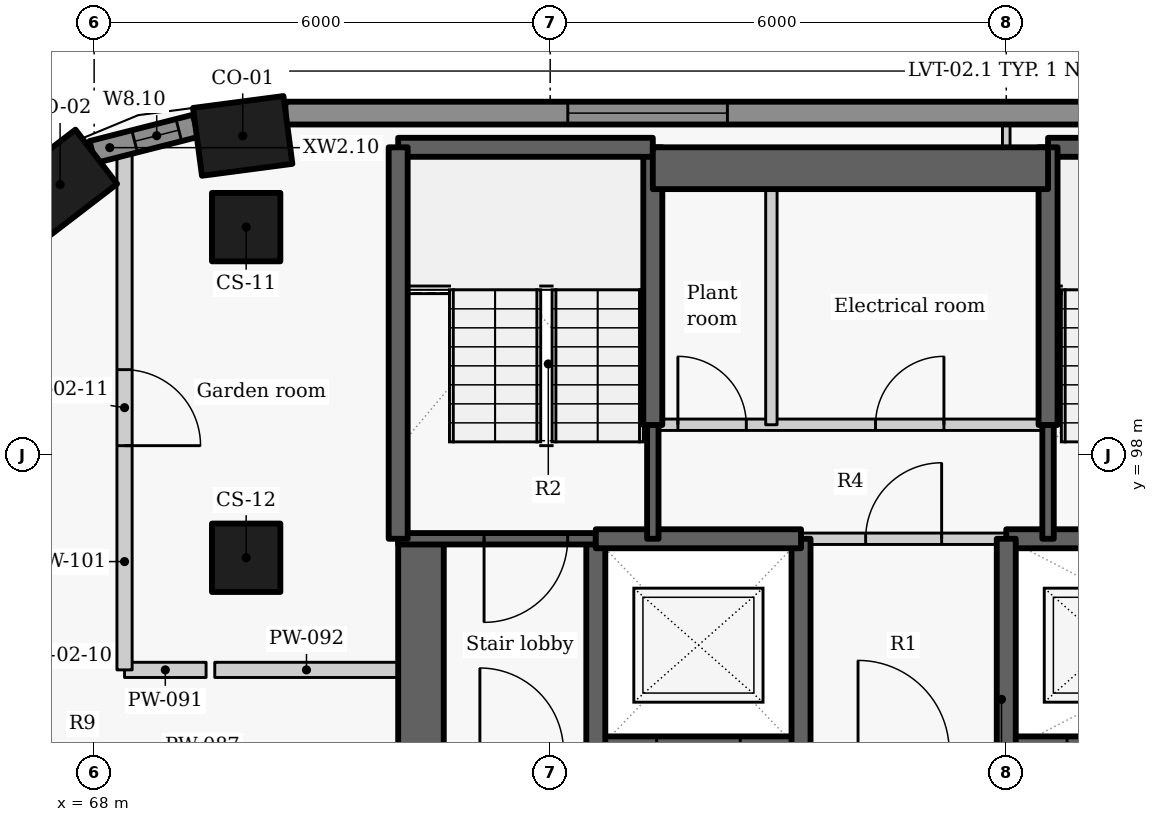
"""IFC4 building model, lengths in metres.
Left out: names, types, materials, properties, quantities, classifications, styles, units other than length and angle.
Written with IfcOpenShell. Run it as: python <this file> out.ifc"""

import sys

from ifc_helpers import new_model, si_unit, direction, frame, frame_2d, origin, origin_2d, place, context, subcontext, project, spatial, rectangle, extrude, element, fill, save


model = new_model("IFC4")
c1 = context("Model", 3, precision=1e-05, world=origin(), true_north=direction((0.0, 1.0)))
c2 = subcontext(c1, "Body", "Model", "MODEL_VIEW")
j1 = project(units=[si_unit("LENGTHUNIT", "METRE"), si_unit("PLANEANGLEUNIT", "RADIAN")], contexts=[c1])
p1 = place(None, origin())
s1 = spatial("IfcSite", under=j1, at=p1, CompositionType="ELEMENT")
p2 = place(p1, origin())
s2 = spatial("IfcBuilding", under=s1, at=p2, CompositionType="ELEMENT")
p3 = place(p2, frame((0.0, 0.0, 183.3)))
s3 = spatial("IfcBuildingStorey", under=s2, at=p3, CompositionType="ELEMENT", Elevation=183.3)
for number, where, z_axis, x_axis in (
    (1, (69.955, 102.2, 0.0), (0.0, 0.0, 1.0), (-0.991, -0.131, 0.0)),
    (2, (67.552, 101.56, 0.0), (0.0, 0.0, 1.0), (-0.793, -0.609, 0.0)),
):
    element("IfcColumn", number, at=place(p3, frame(where, z_axis=z_axis, x_axis=x_axis)), inside=s3, PredefinedType="COLUMN", context=c2, shape_type="SweptSolid", body=[
        extrude(rectangle(XDim=1.2, YDim=0.9, at=origin_2d()), origin(), (0.0, 0.0, 1.0), 3.3),
    ])
for number, where, z_axis, x_axis in (
    (3, (70.0, 101.0, 0.0), (0.0, 0.0, 1.0), (0.0, -1.0, 0.0)),
    (4, (70.0, 96.65, 0.0), (0.0, 0.0, 1.0), (0.0, -1.0, 0.0)),
):
    element("IfcColumn", number, at=place(p3, frame(where, z_axis=z_axis, x_axis=x_axis)), inside=s3, PredefinedType="COLUMN", context=c2, shape_type="SweptSolid", body=[
        extrude(rectangle(XDim=0.9, YDim=0.9, at=origin_2d()), origin(), (0.0, 0.0, 1.0), 3.3),
    ])
p4 = place(p3, frame((89.449, 102.5, 0.0), z_axis=(0.0, 0.0, 1.0), x_axis=(-1.0, 0.0, 0.0)))
e5 = element("IfcWall", 5, at=p4, inside=s3, PredefinedType="SOLIDWALL", context=c2, shape_type="SweptSolid", body=[
    extrude(rectangle(XDim=18.933, YDim=0.3, at=frame_2d((9.466, 0.0))), origin(), (0.0, 0.0, 1.0), 2.425),
])
p5 = place(p4, frame((3.687, 0.0, 0.9)))
e6 = element("IfcOpeningElement", 6, at=p5, cuts=e5, PredefinedType="OPENING", context=c2, shape_type="SweptSolid", body=[
    extrude(rectangle(XDim=2.1, YDim=1.1, at=frame_2d((1.05, 0.55))), frame((0.0, 0.16, 0.0), z_axis=(0.0, -1.0, 0.0), x_axis=(1.0, 0.0, 0.0)), (0.0, 0.0, 1.0), 0.32),
])
p6 = place(p4, frame((13.118, 0.0, 0.9)))
e7 = element("IfcOpeningElement", 7, at=p6, cuts=e5, PredefinedType="OPENING", context=c2, shape_type="SweptSolid", body=[
    extrude(rectangle(XDim=2.1, YDim=1.1, at=frame_2d((1.05, 0.55))), frame((0.0, 0.16, 0.0), z_axis=(0.0, -1.0, 0.0), x_axis=(1.0, 0.0, 0.0)), (0.0, 0.0, 1.0), 0.32),
])
p7 = place(p3, frame((69.336, 102.333, 0.0), z_axis=(0.0, 0.0, 1.0), x_axis=(-0.969037396898, -0.246914000036, 0.0)))
e8 = element("IfcWall", 8, at=p7, inside=s3, PredefinedType="SOLIDWALL", context=c2, shape_type="SweptSolid", body=[
    extrude(rectangle(XDim=1.403, YDim=0.3, at=frame_2d((0.702, 0.0))), origin(), (0.0, 0.0, 1.0), 2.425),
])
p8 = place(p7, frame((0.229, 0.0, 0.9)))
e9 = element("IfcOpeningElement", 9, at=p8, cuts=e8, PredefinedType="OPENING", context=c2, shape_type="SweptSolid", body=[
    extrude(rectangle(XDim=0.6, YDim=1.1, at=frame_2d((0.3, 0.55))), frame((0.0, 0.16, 0.0), z_axis=(0.0, -1.0, 0.0), x_axis=(1.0, 0.0, 0.0)), (0.0, 0.0, 1.0), 0.32),
])
p9 = place(p3, frame((72.3, 87.8, -0.275), z_axis=(0.0, 0.0, 1.0), x_axis=(0.0, 1.0, 0.0)))
e10 = element("IfcWall", 10, at=p9, inside=s3, PredefinedType="SHEAR", context=c2, shape_type="SweptSolid", body=[
    extrude(rectangle(XDim=9.1, YDim=0.6, at=frame_2d((4.55, 0.0))), origin(), (0.0, 0.0, 1.0), 3.3),
])
p10 = place(p9, frame((3.852, 0.0, 0.275)))
e11 = element("IfcOpeningElement", 11, at=p10, cuts=e10, PredefinedType="OPENING", context=c2, shape_type="SweptSolid", body=[
    extrude(rectangle(XDim=1.5, YDim=2.1, at=frame_2d((0.75, 1.05))), frame((0.0, 0.31, 0.0), z_axis=(0.0, -1.0, 0.0), x_axis=(1.0, 0.0, 0.0)), (0.0, 0.0, 1.0), 0.62),
])
p11 = place(p3, frame((74.597, 94.1, -0.275), z_axis=(0.0, 0.0, 1.0), x_axis=(1.0, 0.0, 0.0)))
e12 = element("IfcWall", 12, at=p11, inside=s3, PredefinedType="SHEAR", context=c2, shape_type="SweptSolid", body=[
    extrude(rectangle(XDim=2.706, YDim=0.4, at=frame_2d((1.353, 0.0))), origin(), (0.0, 0.0, 1.0), 3.3),
])
p12 = place(p11, frame((0.803, 0.0, 0.275)))
e13 = element("IfcOpeningElement", 13, at=p12, cuts=e12, PredefinedType="OPENING", context=c2, shape_type="SweptSolid", body=[
    extrude(rectangle(XDim=1.1, YDim=2.1, at=frame_2d((0.55, 1.05))), frame((0.0, 0.21, 0.0), z_axis=(0.0, -1.0, 0.0), x_axis=(1.0, 0.0, 0.0)), (0.0, 0.0, 1.0), 0.42),
])
p13 = place(p3, frame((79.997, 94.1, -0.275), z_axis=(0.0, 0.0, 1.0), x_axis=(1.0, 0.0, 0.0)))
e14 = element("IfcWall", 14, at=p13, inside=s3, PredefinedType="SHEAR", context=c2, shape_type="SweptSolid", body=[
    extrude(rectangle(XDim=5.406, YDim=0.4, at=frame_2d((2.703, 0.0))), origin(), (0.0, 0.0, 1.0), 3.3),
])
p14 = place(p13, frame((0.803, 0.0, 0.275)))
e15 = element("IfcOpeningElement", 15, at=p14, cuts=e14, PredefinedType="OPENING", context=c2, shape_type="SweptSolid", body=[
    extrude(rectangle(XDim=1.1, YDim=2.1, at=frame_2d((0.55, 1.05))), frame((0.0, 0.21, 0.0), z_axis=(0.0, -1.0, 0.0), x_axis=(1.0, 0.0, 0.0)), (0.0, 0.0, 1.0), 0.42),
])
p15 = place(p3, frame((74.6, 94.1, -0.275), z_axis=(0.0, 0.0, 1.0), x_axis=(0.0, 1.0, 0.0)))
e16 = element("IfcWall", 16, at=p15, inside=s3, PredefinedType="SHEAR", context=c2, shape_type="SweptSolid", body=[
    extrude(rectangle(XDim=2.8, YDim=0.25, at=frame_2d((1.4, 0.0))), origin(), (0.0, 0.0, 1.0), 3.3),
])
p16 = place(p3, frame((74.6, 96.9, -0.275), z_axis=(0.0, 0.0, 1.0), x_axis=(-1.0, 0.0, 0.0)))
e17 = element("IfcWall", 17, at=p16, inside=s3, PredefinedType="SHEAR", context=c2, shape_type="SweptSolid", body=[
    extrude(rectangle(XDim=2.6, YDim=0.15, at=frame_2d((1.3, 0.0))), origin(), (0.0, 0.0, 1.0), 3.3),
])
p17 = place(p16, frame((0.37, 0.0, 0.275)))
e18 = element("IfcOpeningElement", 18, at=p17, cuts=e17, PredefinedType="OPENING", context=c2, shape_type="SweptSolid", body=[
    extrude(rectangle(XDim=1.1, YDim=2.1, at=frame_2d((0.55, 1.05))), frame((0.0, 0.085, 0.0), z_axis=(0.0, -1.0, 0.0), x_axis=(1.0, 0.0, 0.0)), (0.0, 0.0, 1.0), 0.17),
])
p18 = place(p3, frame((77.3, 94.1, -0.275), z_axis=(0.0, 0.0, 1.0), x_axis=(0.0, 1.0, 0.0)))
e19 = element("IfcWall", 19, at=p18, inside=s3, PredefinedType="SHEAR", context=c2, shape_type="SweptSolid", body=[
    extrude(rectangle(XDim=2.8, YDim=0.25, at=frame_2d((1.4, 0.0))), origin(), (0.0, 0.0, 1.0), 3.3),
])
p19 = place(p3, frame((74.6, 96.9, -0.275), z_axis=(0.0, 0.0, 1.0), x_axis=(1.0, 0.0, 0.0)))
e20 = element("IfcWall", 20, at=p19, inside=s3, PredefinedType="SHEAR", context=c2, shape_type="SweptSolid", body=[
    extrude(rectangle(XDim=2.7, YDim=0.25, at=frame_2d((1.35, 0.0))), origin(), (0.0, 0.0, 1.0), 3.3),
])
p20 = place(p3, frame((80.0, 96.9, -0.275), z_axis=(0.0, 0.0, 1.0), x_axis=(1.0, 0.0, 0.0)))
e21 = element("IfcWall", 21, at=p20, inside=s3, PredefinedType="SHEAR", context=c2, shape_type="SweptSolid", body=[
    extrude(rectangle(XDim=8.0, YDim=0.25, at=frame_2d((4.0, 0.0))), origin(), (0.0, 0.0, 1.0), 3.3),
])
p21 = place(p20, frame((3.849, 0.0, 0.275)))
e22 = element("IfcOpeningElement", 22, at=p21, cuts=e21, PredefinedType="OPENING", context=c2, shape_type="SweptSolid", body=[
    extrude(rectangle(XDim=1.1, YDim=2.1, at=frame_2d((0.55, 1.05))), frame((0.0, 0.135, 0.0), z_axis=(0.0, -1.0, 0.0), x_axis=(1.0, 0.0, 0.0)), (0.0, 0.0, 1.0), 0.27),
])
p22 = place(p3, frame((80.0, 94.1, -0.275), z_axis=(0.0, 0.0, 1.0), x_axis=(0.0, 1.0, 0.0)))
e23 = element("IfcWall", 23, at=p22, inside=s3, PredefinedType="SHEAR", context=c2, shape_type="SweptSolid", body=[
    extrude(rectangle(XDim=2.8, YDim=0.25, at=frame_2d((1.4, 0.0))), origin(), (0.0, 0.0, 1.0), 3.3),
])
p23 = place(p3, frame((77.3, 96.9, 0.0), z_axis=(0.0, 0.0, 1.0), x_axis=(1.0, 0.0, 0.0)))
e24 = element("IfcWall", 24, at=p23, inside=s3, PredefinedType="PARTITIONING", context=c2, shape_type="SweptSolid", body=[
    extrude(rectangle(XDim=2.7, YDim=0.15, at=frame_2d((1.35, 0.0))), origin(), (0.0, 0.0, 1.0), 3.025),
])
p24 = place(p23, frame((0.85, 0.0, 0.0)))
e25 = element("IfcOpeningElement", 25, at=p24, cuts=e24, PredefinedType="OPENING", context=c2, shape_type="SweptSolid", body=[
    extrude(rectangle(XDim=1.0, YDim=2.1, at=frame_2d((0.5, 1.05))), frame((0.0, 0.085, 0.0), z_axis=(0.0, -1.0, 0.0), x_axis=(1.0, 0.0, 0.0)), (0.0, 0.0, 1.0), 0.17),
])
p25 = place(p3, frame((75.35, 96.9, -0.275), z_axis=(0.0, 0.0, 1.0), x_axis=(0.0, 1.0, 0.0)))
e26 = element("IfcWall", 26, at=p25, inside=s3, PredefinedType="SHEAR", context=c2, shape_type="SweptSolid", body=[
    extrude(rectangle(XDim=1.503, YDim=0.15, at=frame_2d((0.751, 0.0))), origin(), (0.0, 0.0, 1.0), 3.3),
])
p26 = place(p3, frame((75.35, 98.397, -0.275), z_axis=(0.0, 0.0, 1.0), x_axis=(0.0, 1.0, 0.0)))
e27 = element("IfcWall", 27, at=p26, inside=s3, PredefinedType="SHEAR", context=c2, shape_type="SweptSolid", body=[
    extrude(rectangle(XDim=3.653, YDim=0.25, at=frame_2d((1.827, 0.0))), origin(), (0.0, 0.0, 1.0), 3.3),
])
p27 = place(p3, frame((72.0, 102.05, -0.275), z_axis=(0.0, 0.0, 1.0), x_axis=(1.0, 0.0, 0.0)))
e28 = element("IfcWall", 28, at=p27, inside=s3, PredefinedType="SHEAR", context=c2, shape_type="SweptSolid", body=[
    extrude(rectangle(XDim=3.35, YDim=0.25, at=frame_2d((1.675, 0.0))), origin(), (0.0, 0.0, 1.0), 3.3),
])
p28 = place(p3, frame((80.55, 102.05, -0.275), z_axis=(0.0, 0.0, 1.0), x_axis=(1.0, 0.0, 0.0)))
e29 = element("IfcWall", 29, at=p28, inside=s3, PredefinedType="SHEAR", context=c2, shape_type="SweptSolid", body=[
    extrude(rectangle(XDim=2.85, YDim=0.25, at=frame_2d((1.425, 0.0))), origin(), (0.0, 0.0, 1.0), 3.3),
])
p29 = place(p3, frame((72.0, 96.9, -0.275), z_axis=(0.0, 0.0, 1.0), x_axis=(0.0, 1.0, 0.0)))
e30 = element("IfcWall", 30, at=p29, inside=s3, PredefinedType="SHEAR", context=c2, shape_type="SweptSolid", body=[
    extrude(rectangle(XDim=5.15, YDim=0.25, at=frame_2d((2.575, 0.0))), origin(), (0.0, 0.0, 1.0), 3.3),
])
p30 = place(p3, frame((80.55, 96.9, -0.275), z_axis=(0.0, 0.0, 1.0), x_axis=(0.0, 1.0, 0.0)))
e31 = element("IfcWall", 31, at=p30, inside=s3, PredefinedType="SHEAR", context=c2, shape_type="SweptSolid", body=[
    extrude(rectangle(XDim=1.503, YDim=0.15, at=frame_2d((0.751, 0.0))), origin(), (0.0, 0.0, 1.0), 3.3),
])
p31 = place(p3, frame((80.55, 98.397, -0.275), z_axis=(0.0, 0.0, 1.0), x_axis=(0.0, 1.0, 0.0)))
e32 = element("IfcWall", 32, at=p31, inside=s3, PredefinedType="SHEAR", context=c2, shape_type="SweptSolid", body=[
    extrude(rectangle(XDim=3.653, YDim=0.25, at=frame_2d((1.827, 0.0))), origin(), (0.0, 0.0, 1.0), 3.3),
])
p32 = place(p3, frame((75.35, 101.775, -0.275), z_axis=(0.0, 0.0, 1.0), x_axis=(1.0, 0.0, 0.0)))
e33 = element("IfcWall", 33, at=p32, inside=s3, PredefinedType="SHEAR", context=c2, shape_type="SweptSolid", body=[
    extrude(rectangle(XDim=5.2, YDim=0.55, at=frame_2d((2.6, 0.0))), origin(), (0.0, 0.0, 1.0), 3.3),
])
p33 = place(p3, frame((75.35, 98.4, 0.0), z_axis=(0.0, 0.0, 1.0), x_axis=(1.0, 0.0, 0.0)))
e34 = element("IfcWall", 34, at=p33, inside=s3, PredefinedType="PARTITIONING", context=c2, shape_type="SweptSolid", body=[
    extrude(rectangle(XDim=5.2, YDim=0.15, at=frame_2d((2.6, 0.0))), origin(), (0.0, 0.0, 1.0), 3.025),
])
p34 = place(p33, frame((0.33, 0.0, 0.0)))
e35 = element("IfcOpeningElement", 35, at=p34, cuts=e34, PredefinedType="OPENING", context=c2, shape_type="SweptSolid", body=[
    extrude(rectangle(XDim=0.9, YDim=2.1, at=frame_2d((0.45, 1.05))), frame((0.0, 0.085, 0.0), z_axis=(0.0, -1.0, 0.0), x_axis=(1.0, 0.0, 0.0)), (0.0, 0.0, 1.0), 0.17),
])
p35 = place(p33, frame((2.93, 0.0, 0.0)))
e36 = element("IfcOpeningElement", 36, at=p35, cuts=e34, PredefinedType="OPENING", context=c2, shape_type="SweptSolid", body=[
    extrude(rectangle(XDim=0.9, YDim=2.1, at=frame_2d((0.45, 1.05))), frame((0.0, 0.085, 0.0), z_axis=(0.0, -1.0, 0.0), x_axis=(1.0, 0.0, 0.0)), (0.0, 0.0, 1.0), 0.17),
])
p36 = place(p3, frame((76.91, 98.4, 0.0), z_axis=(0.0, 0.0, 1.0), x_axis=(0.0, 1.0, 0.0)))
e37 = element("IfcWall", 37, at=p36, inside=s3, PredefinedType="PARTITIONING", context=c2, shape_type="SweptSolid", body=[
    extrude(rectangle(XDim=3.65, YDim=0.15, at=frame_2d((1.825, 0.0))), origin(), (0.0, 0.0, 1.0), 3.025),
])
p37 = place(p3, frame((68.4, 95.175, 0.0), z_axis=(0.0, 0.0, 1.0), x_axis=(1.0, 0.0, 0.0)))
e38 = element("IfcWall", 38, at=p37, inside=s3, PredefinedType="PARTITIONING", context=c2, shape_type="SweptSolid", body=[
    extrude(rectangle(XDim=1.073, YDim=0.2, at=frame_2d((0.537, 0.0))), origin(), (0.0, 0.0, 1.0), 3.025),
])
p38 = place(p3, frame((69.587, 95.175, 0.0), z_axis=(0.0, 0.0, 1.0), x_axis=(1.0, 0.0, 0.0)))
e39 = element("IfcWall", 39, at=p38, inside=s3, PredefinedType="PARTITIONING", context=c2, shape_type="SweptSolid", body=[
    extrude(rectangle(XDim=2.413, YDim=0.2, at=frame_2d((1.207, 0.0))), origin(), (0.0, 0.0, 1.0), 2.505),
])
p39 = place(p3, frame((68.4, 102.074, 0.0), z_axis=(0.0, 0.0, 1.0), x_axis=(0.0, -1.0, 0.0)))
e40 = element("IfcWall", 40, at=p39, inside=s3, PredefinedType="PARTITIONING", context=c2, shape_type="SweptSolid", body=[
    extrude(rectangle(XDim=6.899, YDim=0.2, at=frame_2d((3.449, 0.0))), origin(), (0.0, 0.0, 1.0), 2.405),
])
p40 = place(p39, frame((2.949, 0.0, 0.0)))
e41 = element("IfcOpeningElement", 41, at=p40, cuts=e40, PredefinedType="OPENING", context=c2, shape_type="SweptSolid", body=[
    extrude(rectangle(XDim=1.0, YDim=2.1, at=frame_2d((0.5, 1.05))), frame((0.0, 0.11, 0.0), z_axis=(0.0, -1.0, 0.0), x_axis=(1.0, 0.0, 0.0)), (0.0, 0.0, 1.0), 0.22),
])
p41 = place(p3, frame((80.0, 102.05, 0.0), z_axis=(0.0, 0.0, 1.0), x_axis=(0.0, 1.0, 0.0)))
e42 = element("IfcWall", 42, at=p41, inside=s3, PredefinedType="PARTITIONING", context=c2, shape_type="SweptSolid", body=[
    extrude(rectangle(XDim=0.3, YDim=0.1, at=frame_2d((0.15, 0.0))), origin(), (0.0, 0.0, 1.0), 3.025),
])
p42 = place(p6, origin())
e43 = element("IfcWindow", 43, at=p42, inside=s3, PartitioningType="SINGLE_PANEL", PredefinedType="WINDOW", context=c2, shape_type="SweptSolid", body=[
    extrude(rectangle(XDim=2.1, YDim=1.1, at=frame_2d((1.05, 0.55))), frame((0.0, 0.03, 0.0), z_axis=(0.0, -1.0, 0.0), x_axis=(1.0, 0.0, 0.0)), (0.0, 0.0, 1.0), 0.06),
])
fill(e7, e43)
p43 = place(p8, origin())
e44 = element("IfcWindow", 44, at=p43, inside=s3, PartitioningType="SINGLE_PANEL", PredefinedType="WINDOW", context=c2, shape_type="SweptSolid", body=[
    extrude(rectangle(XDim=0.6, YDim=1.1, at=frame_2d((0.3, 0.55))), frame((0.0, 0.03, 0.0), z_axis=(0.0, -1.0, 0.0), x_axis=(1.0, 0.0, 0.0)), (0.0, 0.0, 1.0), 0.06),
])
fill(e9, e44)
p44 = place(p24, origin())
e45 = element("IfcDoor", 45, at=p44, inside=s3, OperationType="SINGLE_SWING_RIGHT", PredefinedType="DOOR", context=c2, shape_type="SweptSolid", body=[
    extrude(rectangle(XDim=1.0, YDim=2.1, at=frame_2d((0.5, 1.05))), frame((0.0, 0.025, 0.0), z_axis=(0.0, -1.0, 0.0), x_axis=(1.0, 0.0, 0.0)), (0.0, 0.0, 1.0), 0.05),
])
fill(e25, e45)
p45 = place(p34, origin())
e46 = element("IfcDoor", 46, at=p45, inside=s3, OperationType="SINGLE_SWING_LEFT", PredefinedType="DOOR", context=c2, shape_type="SweptSolid", body=[
    extrude(rectangle(XDim=0.9, YDim=2.1, at=frame_2d((0.45, 1.05))), frame((0.0, 0.025, 0.0), z_axis=(0.0, -1.0, 0.0), x_axis=(1.0, 0.0, 0.0)), (0.0, 0.0, 1.0), 0.05),
])
fill(e35, e46)
p46 = place(p35, origin())
e47 = element("IfcDoor", 47, at=p46, inside=s3, OperationType="SINGLE_SWING_RIGHT", PredefinedType="DOOR", context=c2, shape_type="SweptSolid", body=[
    extrude(rectangle(XDim=0.9, YDim=2.1, at=frame_2d((0.45, 1.05))), frame((0.0, 0.025, 0.0), z_axis=(0.0, -1.0, 0.0), x_axis=(1.0, 0.0, 0.0)), (0.0, 0.0, 1.0), 0.05),
])
fill(e36, e47)
p47 = place(p17, origin())
e48 = element("IfcDoor", 48, at=p47, inside=s3, OperationType="SINGLE_SWING_RIGHT", PredefinedType="DOOR", context=c2, shape_type="SweptSolid", body=[
    extrude(rectangle(XDim=1.1, YDim=2.1, at=frame_2d((0.55, 1.05))), frame((0.0, 0.025, 0.0), z_axis=(0.0, -1.0, 0.0), x_axis=(1.0, 0.0, 0.0)), (0.0, 0.0, 1.0), 0.05),
])
fill(e18, e48)
p48 = place(p40, origin())
e49 = element("IfcDoor", 49, at=p48, inside=s3, OperationType="SINGLE_SWING_RIGHT", PredefinedType="DOOR", context=c2, shape_type="SweptSolid", body=[
    extrude(rectangle(XDim=1.0, YDim=2.1, at=frame_2d((0.5, 1.05))), frame((0.0, 0.025, 0.0), z_axis=(0.0, -1.0, 0.0), x_axis=(1.0, 0.0, 0.0)), (0.0, 0.0, 1.0), 0.05),
])
fill(e41, e49)
save(model, sys.argv[1])
